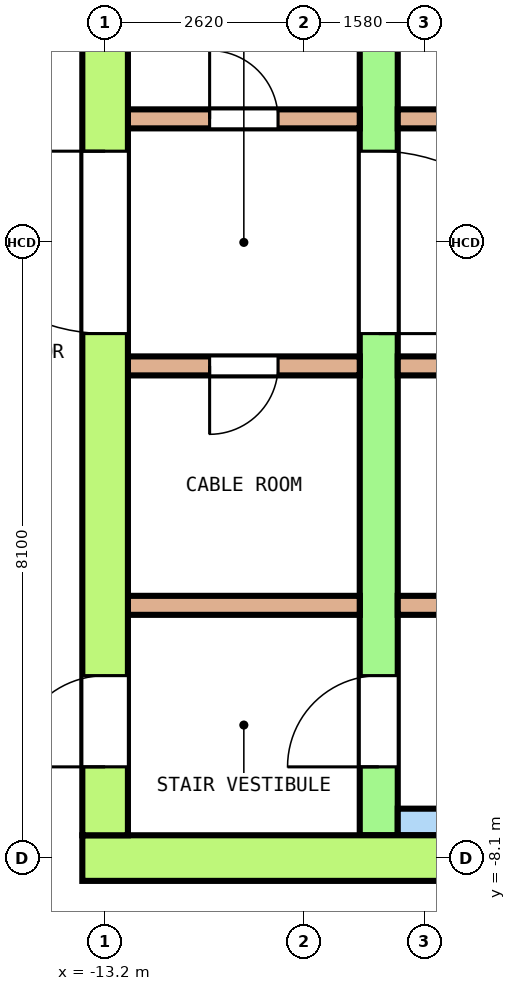
"""IFC4 building model, lengths in metres.
Left out: names, types, materials, properties, quantities, classifications, styles, units other than length and angle.
Written with IfcOpenShell. Run it as: python <this file> out.ifc"""

import sys

from ifc_helpers import new_model, si_unit, direction, frame, frame_2d, origin, place, context, subcontext, project, spatial, polyline, rectangle, outline, extrude, element, fill, save


model = new_model("IFC4")
c1 = context("Model", 3, precision=1e-05, world=origin(), true_north=direction((0.0, 1.0)))
c2 = subcontext(c1, "Body", "Model", "MODEL_VIEW")
j1 = project(units=[si_unit("LENGTHUNIT", "METRE"), si_unit("PLANEANGLEUNIT", "RADIAN")], contexts=[c1])
p1 = place(None, origin())
s1 = spatial("IfcSite", under=j1, at=p1, CompositionType="ELEMENT")
p2 = place(p1, origin())
s2 = spatial("IfcBuilding", under=s1, at=p2, CompositionType="ELEMENT")
p3 = place(p2, frame((0.0, 0.0, 245.4)))
s3 = spatial("IfcBuildingStorey", under=s2, at=p3, CompositionType="ELEMENT", Elevation=245.4)
p4 = place(p3, frame((-23.551, -2.008, 0.0), z_axis=(0.0, 0.0, 1.0), x_axis=(0.499997939216, -0.866026593575, 0.0)))
e1 = element("IfcWall", 1, at=p4, inside=s3, PredefinedType="SOLIDWALL", context=c2, shape_type="SweptSolid", body=[
    extrude(outline(polyline([(-0.027, -0.1), (0.979, -0.1), (1.986, -0.1), (2.992, -0.1), (3.999, -0.1), (5.005, -0.1), (6.011, -0.1), (7.018, -0.1), (8.024, -0.1), (9.03, -0.1), (10.037, -0.1), (11.043, -0.1), (12.049, -0.1), (13.056, -0.1), (14.062, -0.1), (15.068, -0.1), (16.075, -0.1), (17.081, -0.1), (18.087, -0.1), (19.094, -0.1), (20.1, -0.1), (20.046, 0.1), (19.045, 0.1), (18.044, 0.1), (17.043, 0.1), (16.042, 0.1), (15.042, 0.1), (14.041, 0.1), (13.04, 0.1), (12.039, 0.1), (11.038, 0.1), (10.037, 0.1), (9.036, 0.1), (8.035, 0.1), (7.034, 0.1), (6.033, 0.1), (5.032, 0.1), (4.031, 0.1), (3.03, 0.1), (2.029, 0.1), (1.028, 0.1), (0.027, 0.1), (-0.027, -0.1)])), origin(), (0.0, 0.0, 1.0), 3.7),
])
p5 = place(p4, frame((0.557, 0.0, 0.1)))
e2 = element("IfcOpeningElement", 2, at=p5, cuts=e1, PredefinedType="OPENING", context=c2, shape_type="SweptSolid", body=[
    extrude(rectangle(XDim=2.9, YDim=2.65, at=frame_2d((1.45, 1.325))), frame((0.0, 0.11, 0.0), z_axis=(0.0, -1.0, 0.0), x_axis=(1.0, 0.0, 0.0)), (0.0, 0.0, 1.0), 0.22),
])
p6 = place(p4, frame((4.572, 0.0, 0.1)))
e3 = element("IfcOpeningElement", 3, at=p6, cuts=e1, PredefinedType="OPENING", context=c2, shape_type="SweptSolid", body=[
    extrude(rectangle(XDim=2.9, YDim=2.65, at=frame_2d((1.45, 1.325))), frame((0.0, 0.11, 0.0), z_axis=(0.0, -1.0, 0.0), x_axis=(1.0, 0.0, 0.0)), (0.0, 0.0, 1.0), 0.22),
])
p7 = place(p4, frame((9.137, 0.0, 0.0)))
e4 = element("IfcOpeningElement", 4, at=p7, cuts=e1, PredefinedType="OPENING", context=c2, shape_type="SweptSolid", body=[
    extrude(rectangle(XDim=1.8, YDim=2.4, at=frame_2d((0.9, 1.2))), frame((0.0, 0.11, 0.0), z_axis=(0.0, -1.0, 0.0), x_axis=(1.0, 0.0, 0.0)), (0.0, 0.0, 1.0), 0.22),
])
p8 = place(p4, frame((9.137, 0.0, 2.55)))
e5 = element("IfcOpeningElement", 5, at=p8, cuts=e1, PredefinedType="OPENING", context=c2, shape_type="SweptSolid", body=[
    extrude(rectangle(XDim=1.8, YDim=0.2, at=frame_2d((0.9, 0.1))), frame((0.0, 0.11, 0.0), z_axis=(0.0, -1.0, 0.0), x_axis=(1.0, 0.0, 0.0)), (0.0, 0.0, 1.0), 0.22),
])
p9 = place(p4, frame((12.601, 0.0, 0.1)))
e6 = element("IfcOpeningElement", 6, at=p9, cuts=e1, PredefinedType="OPENING", context=c2, shape_type="SweptSolid", body=[
    extrude(rectangle(XDim=2.9, YDim=2.65, at=frame_2d((1.45, 1.325))), frame((0.0, 0.11, 0.0), z_axis=(0.0, -1.0, 0.0), x_axis=(1.0, 0.0, 0.0)), (0.0, 0.0, 1.0), 0.22),
])
p10 = place(p4, frame((16.616, 0.0, 0.1)))
e7 = element("IfcOpeningElement", 7, at=p10, cuts=e1, PredefinedType="OPENING", context=c2, shape_type="SweptSolid", body=[
    extrude(rectangle(XDim=2.9, YDim=2.65, at=frame_2d((1.45, 1.325))), frame((0.0, 0.11, 0.0), z_axis=(0.0, -1.0, 0.0), x_axis=(1.0, 0.0, 0.0)), (0.0, 0.0, 1.0), 0.22),
])
p11 = place(p3, frame((-13.5, -8.1, 0.0), z_axis=(0.0, 0.0, 1.0), x_axis=(1.0, 0.0, 0.0)))
e8 = element("IfcWall", 8, at=p11, inside=s3, PredefinedType="SHEAR", context=c2, shape_type="SweptSolid", body=[
    extrude(rectangle(XDim=27.0, YDim=0.6, at=frame_2d((13.5, 0.0))), origin(), (0.0, 0.0, 1.0), 3.7),
])
p12 = place(p11, frame((15.05, 0.0, 0.0)))
e9 = element("IfcOpeningElement", 9, at=p12, cuts=e8, PredefinedType="OPENING", context=c2, shape_type="SweptSolid", body=[
    extrude(rectangle(XDim=1.2, YDim=2.1, at=frame_2d((0.6, 1.05))), frame((0.0, 0.31, 0.0), z_axis=(0.0, -1.0, 0.0), x_axis=(1.0, 0.0, 0.0)), (0.0, 0.0, 1.0), 0.62),
])
p13 = place(p3, frame((-13.2, -7.8, 0.0), z_axis=(0.0, 0.0, 1.0), x_axis=(0.0, 1.0, 0.0)))
e10 = element("IfcWall", 10, at=p13, inside=s3, PredefinedType="SHEAR", context=c2, shape_type="SweptSolid", body=[
    extrude(rectangle(XDim=15.6, YDim=0.6, at=frame_2d((7.8, 0.0))), origin(), (0.0, 0.0, 1.0), 3.7),
])
p14 = place(p13, frame((6.6, 0.0, 0.0)))
e11 = element("IfcOpeningElement", 11, at=p14, cuts=e10, PredefinedType="OPENING", context=c2, shape_type="SweptSolid", body=[
    extrude(rectangle(XDim=2.4, YDim=2.1, at=frame_2d((1.2, 1.05))), frame((0.0, 0.31, 0.0), z_axis=(0.0, -1.0, 0.0), x_axis=(1.0, 0.0, 0.0)), (0.0, 0.0, 1.0), 0.62),
])
p15 = place(p13, frame((13.5, 0.0, 0.0)))
e12 = element("IfcOpeningElement", 12, at=p15, cuts=e10, PredefinedType="OPENING", context=c2, shape_type="SweptSolid", body=[
    extrude(rectangle(XDim=1.2, YDim=2.1, at=frame_2d((0.6, 1.05))), frame((0.0, 0.31, 0.0), z_axis=(0.0, -1.0, 0.0), x_axis=(1.0, 0.0, 0.0)), (0.0, 0.0, 1.0), 0.62),
])
p16 = place(p13, frame((0.9, 0.0, 0.0)))
e13 = element("IfcOpeningElement", 13, at=p16, cuts=e10, PredefinedType="OPENING", context=c2, shape_type="SweptSolid", body=[
    extrude(rectangle(XDim=1.2, YDim=2.1, at=frame_2d((0.6, 1.05))), frame((0.0, 0.31, 0.0), z_axis=(0.0, -1.0, 0.0), x_axis=(1.0, 0.0, 0.0)), (0.0, 0.0, 1.0), 0.62),
])
p17 = place(p3, frame((-9.6, -7.8, 0.0), z_axis=(0.0, 0.0, 1.0), x_axis=(0.0, 1.0, 0.0)))
e14 = element("IfcWall", 14, at=p17, inside=s3, PredefinedType="SHEAR", context=c2, shape_type="SweptSolid", body=[
    extrude(rectangle(XDim=15.6, YDim=0.5, at=frame_2d((7.8, 0.0))), origin(), (0.0, 0.0, 1.0), 3.7),
])
p18 = place(p17, frame((6.6, 0.0, 0.0)))
e15 = element("IfcOpeningElement", 15, at=p18, cuts=e14, PredefinedType="OPENING", context=c2, shape_type="SweptSolid", body=[
    extrude(rectangle(XDim=2.4, YDim=2.1, at=frame_2d((1.2, 1.05))), frame((0.0, 0.26, 0.0), z_axis=(0.0, -1.0, 0.0), x_axis=(1.0, 0.0, 0.0)), (0.0, 0.0, 1.0), 0.52),
])
p19 = place(p17, frame((13.5, 0.0, 0.0)))
e16 = element("IfcOpeningElement", 16, at=p19, cuts=e14, PredefinedType="OPENING", context=c2, shape_type="SweptSolid", body=[
    extrude(rectangle(XDim=1.2, YDim=2.1, at=frame_2d((0.6, 1.05))), frame((0.0, 0.26, 0.0), z_axis=(0.0, -1.0, 0.0), x_axis=(1.0, 0.0, 0.0)), (0.0, 0.0, 1.0), 0.52),
])
p20 = place(p17, frame((0.9, 0.0, 0.0)))
e17 = element("IfcOpeningElement", 17, at=p20, cuts=e14, PredefinedType="OPENING", context=c2, shape_type="SweptSolid", body=[
    extrude(rectangle(XDim=1.2, YDim=2.1, at=frame_2d((0.6, 1.05))), frame((0.0, 0.26, 0.0), z_axis=(0.0, -1.0, 0.0), x_axis=(1.0, 0.0, 0.0)), (0.0, 0.0, 1.0), 0.52),
])
p21 = place(p3, frame((-12.9, 1.625, 0.0), z_axis=(0.0, 0.0, 1.0), x_axis=(1.0, 0.0, 0.0)))
e18 = element("IfcWall", 18, at=p21, inside=s3, PredefinedType="SOLIDWALL", context=c2, shape_type="SweptSolid", body=[
    extrude(rectangle(XDim=3.05, YDim=0.25, at=frame_2d((1.525, 0.0))), origin(), (0.0, 0.0, 1.0), 3.7),
])
p22 = place(p21, frame((1.075, 0.0, 0.0)))
e19 = element("IfcOpeningElement", 19, at=p22, cuts=e18, PredefinedType="OPENING", context=c2, shape_type="SweptSolid", body=[
    extrude(rectangle(XDim=0.9, YDim=2.1, at=frame_2d((0.45, 1.05))), frame((0.0, 0.135, 0.0), z_axis=(0.0, -1.0, 0.0), x_axis=(1.0, 0.0, 0.0)), (0.0, 0.0, 1.0), 0.27),
])
p23 = place(p3, frame((-9.35, 1.625, 0.0), z_axis=(0.0, 0.0, 1.0), x_axis=(1.0, 0.0, 0.0)))
e20 = element("IfcWall", 20, at=p23, inside=s3, PredefinedType="SOLIDWALL", context=c2, shape_type="SweptSolid", body=[
    extrude(rectangle(XDim=18.7, YDim=0.25, at=frame_2d((9.35, 0.0))), origin(), (0.0, 0.0, 1.0), 3.7),
])
p24 = place(p23, frame((7.65, 0.0, 0.0)))
e21 = element("IfcOpeningElement", 21, at=p24, cuts=e20, PredefinedType="OPENING", context=c2, shape_type="SweptSolid", body=[
    extrude(rectangle(XDim=1.1, YDim=2.1, at=frame_2d((0.55, 1.05))), frame((0.0, 0.135, 0.0), z_axis=(0.0, -1.0, 0.0), x_axis=(1.0, 0.0, 0.0)), (0.0, 0.0, 1.0), 0.27),
])
p25 = place(p23, frame((9.95, 0.0, 0.0)))
e22 = element("IfcOpeningElement", 22, at=p25, cuts=e20, PredefinedType="OPENING", context=c2, shape_type="SweptSolid", body=[
    extrude(rectangle(XDim=1.1, YDim=2.1, at=frame_2d((0.55, 1.05))), frame((0.0, 0.135, 0.0), z_axis=(0.0, -1.0, 0.0), x_axis=(1.0, 0.0, 0.0)), (0.0, 0.0, 1.0), 0.27),
])
p26 = place(p23, frame((12.4, 0.0, 0.0)))
e23 = element("IfcOpeningElement", 23, at=p26, cuts=e20, PredefinedType="OPENING", context=c2, shape_type="SweptSolid", body=[
    extrude(rectangle(XDim=1.1, YDim=2.1, at=frame_2d((0.55, 1.05))), frame((0.0, 0.135, 0.0), z_axis=(0.0, -1.0, 0.0), x_axis=(1.0, 0.0, 0.0)), (0.0, 0.0, 1.0), 0.27),
])
p27 = place(p23, frame((0.575, 0.0, 0.0)))
e24 = element("IfcOpeningElement", 24, at=p27, cuts=e20, PredefinedType="OPENING", context=c2, shape_type="SweptSolid", body=[
    extrude(rectangle(XDim=0.9, YDim=2.1, at=frame_2d((0.45, 1.05))), frame((0.0, 0.135, 0.0), z_axis=(0.0, -1.0, 0.0), x_axis=(1.0, 0.0, 0.0)), (0.0, 0.0, 1.0), 0.27),
])
p28 = place(p23, frame((2.919, 0.0, 0.0)))
e25 = element("IfcOpeningElement", 25, at=p28, cuts=e20, PredefinedType="OPENING", context=c2, shape_type="SweptSolid", body=[
    extrude(rectangle(XDim=0.9, YDim=2.1, at=frame_2d((0.45, 1.05))), frame((0.0, 0.135, 0.0), z_axis=(0.0, -1.0, 0.0), x_axis=(1.0, 0.0, 0.0)), (0.0, 0.0, 1.0), 0.27),
])
p29 = place(p23, frame((5.281, 0.0, 0.0)))
e26 = element("IfcOpeningElement", 26, at=p29, cuts=e20, PredefinedType="OPENING", context=c2, shape_type="SweptSolid", body=[
    extrude(rectangle(XDim=0.9, YDim=2.1, at=frame_2d((0.45, 1.05))), frame((0.0, 0.135, 0.0), z_axis=(0.0, -1.0, 0.0), x_axis=(1.0, 0.0, 0.0)), (0.0, 0.0, 1.0), 0.27),
])
p30 = place(p23, frame((14.9, 0.0, 0.0)))
e27 = element("IfcOpeningElement", 27, at=p30, cuts=e20, PredefinedType="OPENING", context=c2, shape_type="SweptSolid", body=[
    extrude(rectangle(XDim=0.9, YDim=2.1, at=frame_2d((0.45, 1.05))), frame((0.0, 0.135, 0.0), z_axis=(0.0, -1.0, 0.0), x_axis=(1.0, 0.0, 0.0)), (0.0, 0.0, 1.0), 0.27),
])
p31 = place(p23, frame((17.225, 0.0, 0.0)))
e28 = element("IfcOpeningElement", 28, at=p31, cuts=e20, PredefinedType="OPENING", context=c2, shape_type="SweptSolid", body=[
    extrude(rectangle(XDim=0.9, YDim=2.1, at=frame_2d((0.45, 1.05))), frame((0.0, 0.135, 0.0), z_axis=(0.0, -1.0, 0.0), x_axis=(1.0, 0.0, 0.0)), (0.0, 0.0, 1.0), 0.27),
])
p32 = place(p3, frame((-12.9, -1.625, 0.0), z_axis=(0.0, 0.0, 1.0), x_axis=(1.0, 0.0, 0.0)))
e29 = element("IfcWall", 29, at=p32, inside=s3, PredefinedType="SOLIDWALL", context=c2, shape_type="SweptSolid", body=[
    extrude(rectangle(XDim=3.05, YDim=0.25, at=frame_2d((1.525, 0.0))), origin(), (0.0, 0.0, 1.0), 3.7),
])
p33 = place(p32, frame((1.075, 0.0, 0.0)))
e30 = element("IfcOpeningElement", 30, at=p33, cuts=e29, PredefinedType="OPENING", context=c2, shape_type="SweptSolid", body=[
    extrude(rectangle(XDim=0.9, YDim=2.1, at=frame_2d((0.45, 1.05))), frame((0.0, 0.135, 0.0), z_axis=(0.0, -1.0, 0.0), x_axis=(1.0, 0.0, 0.0)), (0.0, 0.0, 1.0), 0.27),
])
p34 = place(p3, frame((-9.35, -1.625, 0.0), z_axis=(0.0, 0.0, 1.0), x_axis=(1.0, 0.0, 0.0)))
e31 = element("IfcWall", 31, at=p34, inside=s3, PredefinedType="SOLIDWALL", context=c2, shape_type="SweptSolid", body=[
    extrude(rectangle(XDim=18.7, YDim=0.25, at=frame_2d((9.35, 0.0))), origin(), (0.0, 0.0, 1.0), 3.7),
])
p35 = place(p34, frame((7.65, 0.0, 0.0)))
e32 = element("IfcOpeningElement", 32, at=p35, cuts=e31, PredefinedType="OPENING", context=c2, shape_type="SweptSolid", body=[
    extrude(rectangle(XDim=1.1, YDim=2.1, at=frame_2d((0.55, 1.05))), frame((0.0, 0.135, 0.0), z_axis=(0.0, -1.0, 0.0), x_axis=(1.0, 0.0, 0.0)), (0.0, 0.0, 1.0), 0.27),
])
p36 = place(p34, frame((9.95, 0.0, 0.0)))
e33 = element("IfcOpeningElement", 33, at=p36, cuts=e31, PredefinedType="OPENING", context=c2, shape_type="SweptSolid", body=[
    extrude(rectangle(XDim=1.1, YDim=2.1, at=frame_2d((0.55, 1.05))), frame((0.0, 0.135, 0.0), z_axis=(0.0, -1.0, 0.0), x_axis=(1.0, 0.0, 0.0)), (0.0, 0.0, 1.0), 0.27),
])
p37 = place(p34, frame((12.4, 0.0, 0.0)))
e34 = element("IfcOpeningElement", 34, at=p37, cuts=e31, PredefinedType="OPENING", context=c2, shape_type="SweptSolid", body=[
    extrude(rectangle(XDim=1.1, YDim=2.1, at=frame_2d((0.55, 1.05))), frame((0.0, 0.135, 0.0), z_axis=(0.0, -1.0, 0.0), x_axis=(1.0, 0.0, 0.0)), (0.0, 0.0, 1.0), 0.27),
])
p38 = place(p34, frame((0.575, 0.0, 0.0)))
e35 = element("IfcOpeningElement", 35, at=p38, cuts=e31, PredefinedType="OPENING", context=c2, shape_type="SweptSolid", body=[
    extrude(rectangle(XDim=0.9, YDim=2.1, at=frame_2d((0.45, 1.05))), frame((0.0, 0.135, 0.0), z_axis=(0.0, -1.0, 0.0), x_axis=(1.0, 0.0, 0.0)), (0.0, 0.0, 1.0), 0.27),
])
p39 = place(p34, frame((2.519, 0.0, 0.0)))
e36 = element("IfcOpeningElement", 36, at=p39, cuts=e31, PredefinedType="OPENING", context=c2, shape_type="SweptSolid", body=[
    extrude(rectangle(XDim=0.9, YDim=2.1, at=frame_2d((0.45, 1.05))), frame((0.0, 0.135, 0.0), z_axis=(0.0, -1.0, 0.0), x_axis=(1.0, 0.0, 0.0)), (0.0, 0.0, 1.0), 0.27),
])
p40 = place(p34, frame((4.881, 0.0, 0.0)))
e37 = element("IfcOpeningElement", 37, at=p40, cuts=e31, PredefinedType="OPENING", context=c2, shape_type="SweptSolid", body=[
    extrude(rectangle(XDim=0.9, YDim=2.1, at=frame_2d((0.45, 1.05))), frame((0.0, 0.135, 0.0), z_axis=(0.0, -1.0, 0.0), x_axis=(1.0, 0.0, 0.0)), (0.0, 0.0, 1.0), 0.27),
])
p41 = place(p34, frame((14.9, 0.0, 0.0)))
e38 = element("IfcOpeningElement", 38, at=p41, cuts=e31, PredefinedType="OPENING", context=c2, shape_type="SweptSolid", body=[
    extrude(rectangle(XDim=0.9, YDim=2.1, at=frame_2d((0.45, 1.05))), frame((0.0, 0.135, 0.0), z_axis=(0.0, -1.0, 0.0), x_axis=(1.0, 0.0, 0.0)), (0.0, 0.0, 1.0), 0.27),
])
p42 = place(p34, frame((17.225, 0.0, 0.0)))
e39 = element("IfcOpeningElement", 39, at=p42, cuts=e31, PredefinedType="OPENING", context=c2, shape_type="SweptSolid", body=[
    extrude(rectangle(XDim=0.9, YDim=2.1, at=frame_2d((0.45, 1.05))), frame((0.0, 0.135, 0.0), z_axis=(0.0, -1.0, 0.0), x_axis=(1.0, 0.0, 0.0)), (0.0, 0.0, 1.0), 0.27),
])
p43 = place(p3, frame((-12.9, -4.775, 0.0), z_axis=(0.0, 0.0, 1.0), x_axis=(1.0, 0.0, 0.0)))
e40 = element("IfcWall", 40, at=p43, inside=s3, PredefinedType="SOLIDWALL", context=c2, shape_type="SweptSolid", body=[
    extrude(rectangle(XDim=3.05, YDim=0.25, at=frame_2d((1.525, 0.0))), origin(), (0.0, 0.0, 1.0), 3.7),
])
p44 = place(p3, frame((-9.35, -4.775, 0.0), z_axis=(0.0, 0.0, 1.0), x_axis=(1.0, 0.0, 0.0)))
e41 = element("IfcWall", 41, at=p44, inside=s3, PredefinedType="SOLIDWALL", context=c2, shape_type="SweptSolid", body=[
    extrude(rectangle(XDim=18.7, YDim=0.25, at=frame_2d((9.35, 0.0))), origin(), (0.0, 0.0, 1.0), 3.7),
])
p45 = place(p3, frame((-9.35, -7.625, 0.0), z_axis=(0.0, 0.0, 1.0), x_axis=(1.0, 0.0, 0.0)))
e42 = element("IfcWall", 42, at=p45, inside=s3, PredefinedType="SOLIDWALL", context=c2, shape_type="SweptSolid", body=[
    extrude(rectangle(XDim=5.8, YDim=0.35, at=frame_2d((2.9, 0.0))), origin(), (0.0, 0.0, 1.0), 3.7),
])
p46 = place(p18, origin())
e43 = element("IfcDoor", 43, at=p46, inside=s3, OperationType="DOUBLE_DOOR_SINGLE_SWING", PredefinedType="DOOR", context=c2, shape_type="SweptSolid", body=[
    extrude(rectangle(XDim=2.4, YDim=2.1, at=frame_2d((1.2, 1.05))), frame((0.0, 0.2, 0.0), z_axis=(0.0, -1.0, 0.0), x_axis=(1.0, 0.0, 0.0)), (0.0, 0.0, 1.0), 0.4),
])
fill(e15, e43)
p47 = place(p14, origin())
e44 = element("IfcDoor", 44, at=p47, inside=s3, OperationType="DOUBLE_DOOR_SINGLE_SWING", PredefinedType="DOOR", context=c2, shape_type="SweptSolid", body=[
    extrude(rectangle(XDim=2.4, YDim=2.1, at=frame_2d((1.2, 1.05))), frame((0.0, 0.25, 0.0), z_axis=(0.0, -1.0, 0.0), x_axis=(1.0, 0.0, 0.0)), (0.0, 0.0, 1.0), 0.5),
])
fill(e11, e44)
p48 = place(p20, origin())
e45 = element("IfcDoor", 45, at=p48, inside=s3, OperationType="SINGLE_SWING_RIGHT", PredefinedType="DOOR", context=c2, shape_type="SweptSolid", body=[
    extrude(rectangle(XDim=1.2, YDim=2.1, at=frame_2d((0.6, 1.05))), frame((0.0, 0.2, 0.0), z_axis=(0.0, -1.0, 0.0), x_axis=(1.0, 0.0, 0.0)), (0.0, 0.0, 1.0), 0.4),
])
fill(e17, e45)
p49 = place(p16, origin())
e46 = element("IfcDoor", 46, at=p49, inside=s3, OperationType="SINGLE_SWING_LEFT", PredefinedType="DOOR", context=c2, shape_type="SweptSolid", body=[
    extrude(rectangle(XDim=1.2, YDim=2.1, at=frame_2d((0.6, 1.05))), frame((0.0, 0.25, 0.0), z_axis=(0.0, -1.0, 0.0), x_axis=(1.0, 0.0, 0.0)), (0.0, 0.0, 1.0), 0.5),
])
fill(e13, e46)
p50 = place(p22, origin())
e47 = element("IfcDoor", 47, at=p50, inside=s3, OperationType="SINGLE_SWING_RIGHT", PredefinedType="DOOR", context=c2, shape_type="SweptSolid", body=[
    extrude(rectangle(XDim=0.9, YDim=2.1, at=frame_2d((0.45, 1.05))), frame((0.0, 0.075, 0.0), z_axis=(0.0, -1.0, 0.0), x_axis=(1.0, 0.0, 0.0)), (0.0, 0.0, 1.0), 0.15),
])
fill(e19, e47)
p51 = place(p33, origin())
e48 = element("IfcDoor", 48, at=p51, inside=s3, OperationType="SINGLE_SWING_LEFT", PredefinedType="DOOR", context=c2, shape_type="SweptSolid", body=[
    extrude(rectangle(XDim=0.9, YDim=2.1, at=frame_2d((0.45, 1.05))), frame((0.0, 0.075, 0.0), z_axis=(0.0, -1.0, 0.0), x_axis=(1.0, 0.0, 0.0)), (0.0, 0.0, 1.0), 0.15),
])
fill(e30, e48)
save(model, sys.argv[1])
